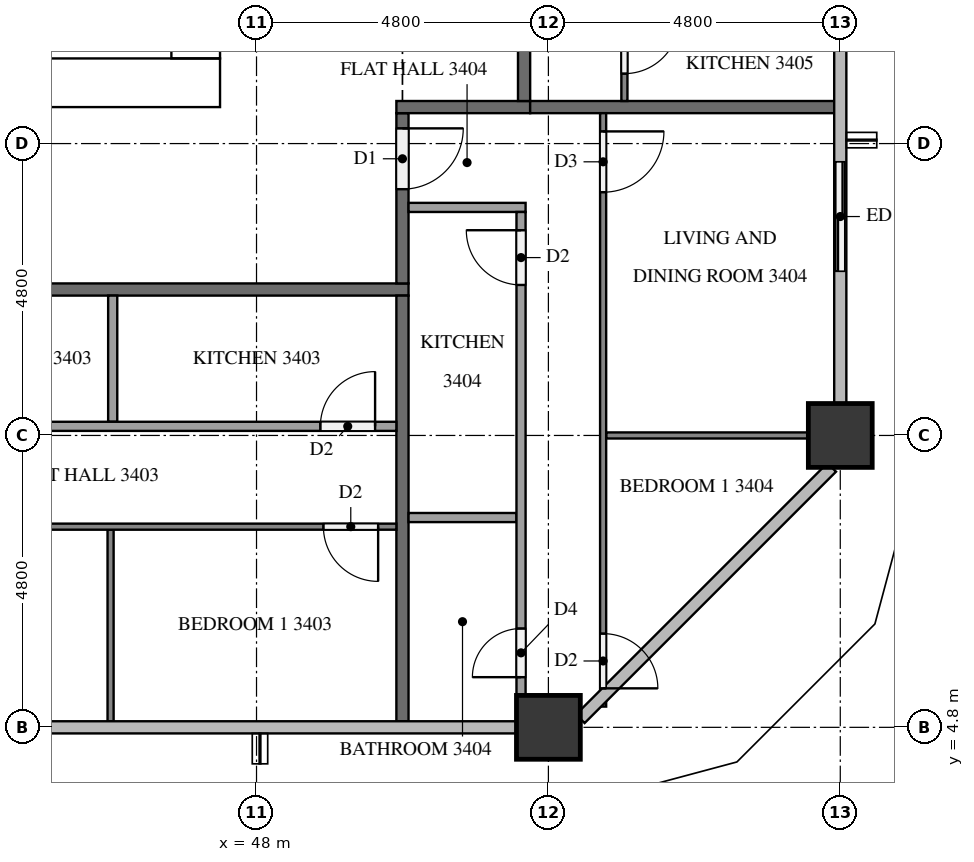
"""IFC4 building model, lengths in metres.
Left out: names, types, materials, properties, quantities, classifications, styles, units other than length and angle.
Written with IfcOpenShell. Run it as: python <this file> out.ifc"""

import sys

from ifc_helpers import new_model, si_unit, direction, frame, frame_2d, origin, origin_2d, place, context, subcontext, project, spatial, rectangle, extrude, element, fill, save


model = new_model("IFC4")
c1 = context("Model", 3, precision=1e-05, world=origin(), true_north=direction((0.0, 1.0)))
c2 = subcontext(c1, "Body", "Model", "MODEL_VIEW")
j1 = project(units=[si_unit("LENGTHUNIT", "METRE"), si_unit("PLANEANGLEUNIT", "RADIAN")], contexts=[c1])
p1 = place(None, origin())
s1 = spatial("IfcSite", under=j1, at=p1, CompositionType="ELEMENT")
p2 = place(p1, origin())
s2 = spatial("IfcBuilding", under=s1, at=p2, CompositionType="ELEMENT")
p3 = place(p2, frame((0.0, 0.0, 133.1)))
s3 = spatial("IfcBuildingStorey", under=s2, at=p3, CompositionType="ELEMENT", Elevation=133.1)
p4 = place(p3, frame((15.0, 15.4, 0.0), z_axis=(0.0, 0.0, 1.0), x_axis=(1.0, 0.0, 0.0)))
e1 = element("IfcWall", 1, at=p4, inside=s3, PredefinedType="SHEAR", context=c2, shape_type="SweptSolid", body=[
    extrude(rectangle(XDim=32.4, YDim=0.8, at=frame_2d((16.2, 0.0))), origin(), (0.0, 0.0, 1.0), 3.2),
])
p5 = place(p4, frame((15.3, 0.0, 0.0)))
e2 = element("IfcOpeningElement", 2, at=p5, cuts=e1, PredefinedType="OPENING", context=c2, shape_type="SweptSolid", body=[
    extrude(rectangle(XDim=1.8, YDim=2.1, at=frame_2d((0.9, 1.05))), frame((0.0, 0.41, 0.0), z_axis=(0.0, -1.0, 0.0), x_axis=(1.0, 0.0, 0.0)), (0.0, 0.0, 1.0), 0.82),
])
p6 = place(p3, frame((47.0, 15.8, 0.0), z_axis=(0.0, 0.0, 1.0), x_axis=(0.0, 1.0, 0.0)))
e3 = element("IfcWall", 3, at=p6, inside=s3, PredefinedType="SHEAR", context=c2, shape_type="SweptSolid", body=[
    extrude(rectangle(XDim=21.2, YDim=0.8, at=frame_2d((10.6, 0.0))), origin(), (0.0, 0.0, 1.0), 3.2),
])
p7 = place(p6, frame((10.3, 0.0, 0.0)))
e4 = element("IfcOpeningElement", 4, at=p7, cuts=e3, PredefinedType="OPENING", context=c2, shape_type="SweptSolid", body=[
    extrude(rectangle(XDim=1.2, YDim=2.1, at=frame_2d((0.6, 1.05))), frame((0.0, 0.41, 0.0), z_axis=(0.0, -1.0, 0.0), x_axis=(1.0, 0.0, 0.0)), (0.0, 0.0, 1.0), 0.82),
])
for number, where, z_axis, x_axis in (
    (5, (52.8, 4.8, 0.0), (0.0, 0.0, 1.0), (1.0, 0.0, 0.0)),
    (6, (57.6, 9.6, 0.0), (0.0, 0.0, 1.0), (1.0, 0.0, 0.0)),
):
    element("IfcColumn", number, at=place(p3, frame(where, z_axis=z_axis, x_axis=x_axis)), inside=s3, PredefinedType="COLUMN", context=c2, shape_type="SweptSolid", body=[
        extrude(rectangle(XDim=1.05, YDim=1.05, at=origin_2d()), origin(), (0.0, 0.0, 1.0), 3.2),
    ])
p8 = place(p3, frame((57.6, 12.0, 0.0), z_axis=(0.0, 0.0, 1.0), x_axis=(0.0, 1.0, 0.0)))
e7 = element("IfcWall", 7, at=p8, inside=s3, PredefinedType="SOLIDWALL", context=c2, shape_type="SweptSolid", body=[
    extrude(rectangle(XDim=2.4, YDim=0.15, at=frame_2d((1.2, 0.0))), origin(), (0.0, 0.0, 1.0), 3.2),
])
p9 = place(p8, frame((0.3, 0.0, 0.0)))
e8 = element("IfcOpeningElement", 8, at=p9, cuts=e7, PredefinedType="OPENING", context=c2, shape_type="SweptSolid", body=[
    extrude(rectangle(XDim=1.8, YDim=2.4, at=frame_2d((0.9, 1.2))), frame((0.0, 0.085, 0.0), z_axis=(0.0, -1.0, 0.0), x_axis=(1.0, 0.0, 0.0)), (0.0, 0.0, 1.0), 0.17),
])
p10 = place(p3, frame((50.5, 12.0, 0.0), z_axis=(0.0, 0.0, 1.0), x_axis=(-1.0, 0.0, 0.0)))
e9 = element("IfcWall", 9, at=p10, inside=s3, PredefinedType="PARTITIONING", context=c2, shape_type="SweptSolid", body=[
    extrude(rectangle(XDim=38.6, YDim=0.2, at=frame_2d((19.3, 0.0))), origin(), (0.0, 0.0, 1.0), 3.2),
])
p11 = place(p10, frame((24.45, 0.0, 0.0)))
e10 = element("IfcOpeningElement", 10, at=p11, cuts=e9, PredefinedType="OPENING", context=c2, shape_type="SweptSolid", body=[
    extrude(rectangle(XDim=1.0, YDim=2.1, at=frame_2d((0.5, 1.05))), frame((0.0, 0.11, 0.0), z_axis=(0.0, -1.0, 0.0), x_axis=(1.0, 0.0, 0.0)), (0.0, 0.0, 1.0), 0.22),
])
p12 = place(p10, frame((10.05, 0.0, 0.0)))
e11 = element("IfcOpeningElement", 11, at=p12, cuts=e9, PredefinedType="OPENING", context=c2, shape_type="SweptSolid", body=[
    extrude(rectangle(XDim=1.0, YDim=2.1, at=frame_2d((0.5, 1.05))), frame((0.0, 0.11, 0.0), z_axis=(0.0, -1.0, 0.0), x_axis=(1.0, 0.0, 0.0)), (0.0, 0.0, 1.0), 0.22),
])
p13 = place(p10, frame((8.35, 0.0, 0.0)))
e12 = element("IfcOpeningElement", 12, at=p13, cuts=e9, PredefinedType="OPENING", context=c2, shape_type="SweptSolid", body=[
    extrude(rectangle(XDim=1.0, YDim=2.1, at=frame_2d((0.5, 1.05))), frame((0.0, 0.11, 0.0), z_axis=(0.0, -1.0, 0.0), x_axis=(1.0, 0.0, 0.0)), (0.0, 0.0, 1.0), 0.22),
])
p14 = place(p3, frame((50.4, 14.9, 0.0), z_axis=(0.0, 0.0, 1.0), x_axis=(0.0, -1.0, 0.0)))
e13 = element("IfcWall", 13, at=p14, inside=s3, PredefinedType="PARTITIONING", context=c2, shape_type="SweptSolid", body=[
    extrude(rectangle(XDim=2.8, YDim=0.2, at=frame_2d((1.4, 0.0))), origin(), (0.0, 0.0, 1.0), 3.2),
])
p15 = place(p14, frame((0.25, 0.0, 0.0)))
e14 = element("IfcOpeningElement", 14, at=p15, cuts=e13, PredefinedType="OPENING", context=c2, shape_type="SweptSolid", body=[
    extrude(rectangle(XDim=1.0, YDim=2.1, at=frame_2d((0.5, 1.05))), frame((0.0, 0.11, 0.0), z_axis=(0.0, -1.0, 0.0), x_axis=(1.0, 0.0, 0.0)), (0.0, 0.0, 1.0), 0.22),
])
p16 = place(p3, frame((50.3, 15.0, 0.0), z_axis=(0.0, 0.0, 1.0), x_axis=(1.0, 0.0, 0.0)))
e15 = element("IfcWall", 15, at=p16, inside=s3, PredefinedType="PARTITIONING", context=c2, shape_type="SweptSolid", body=[
    extrude(rectangle(XDim=2.2, YDim=0.2, at=frame_2d((1.1, 0.0))), origin(), (0.0, 0.0, 1.0), 3.2),
])
p17 = place(p3, frame((52.4, 37.7, 0.0), z_axis=(0.0, 0.0, 1.0), x_axis=(0.0, -1.0, 0.0)))
e16 = element("IfcWall", 16, at=p17, inside=s3, PredefinedType="PARTITIONING", context=c2, shape_type="SweptSolid", body=[
    extrude(rectangle(XDim=22.6, YDim=0.2, at=frame_2d((11.3, 0.0))), origin(), (0.0, 0.0, 1.0), 3.2),
])
p18 = place(p17, frame((0.25, 0.0, 0.0)))
e17 = element("IfcOpeningElement", 17, at=p18, cuts=e16, PredefinedType="OPENING", context=c2, shape_type="SweptSolid", body=[
    extrude(rectangle(XDim=1.0, YDim=2.1, at=frame_2d((0.5, 1.05))), frame((0.0, 0.11, 0.0), z_axis=(0.0, -1.0, 0.0), x_axis=(1.0, 0.0, 0.0)), (0.0, 0.0, 1.0), 0.22),
])
p19 = place(p3, frame((50.4, 11.9, 0.0), z_axis=(0.0, 0.0, 1.0), x_axis=(0.0, -1.0, 0.0)))
e18 = element("IfcWall", 18, at=p19, inside=s3, PredefinedType="PARTITIONING", context=c2, shape_type="SweptSolid", body=[
    extrude(rectangle(XDim=7.0, YDim=0.2, at=frame_2d((3.5, 0.0))), origin(), (0.0, 0.0, 1.0), 3.2),
])
p20 = place(p3, frame((52.5, 15.0, 0.0), z_axis=(0.0, 0.0, 1.0), x_axis=(1.0, 0.0, 0.0)))
e19 = element("IfcWall", 19, at=p20, inside=s3, PredefinedType="PARTITIONING", context=c2, shape_type="SweptSolid", body=[
    extrude(rectangle(XDim=5.0, YDim=0.2, at=frame_2d((2.5, 0.0))), origin(), (0.0, 0.0, 1.0), 3.2),
])
p21 = place(p3, frame((45.6, 8.05, 0.0), z_axis=(0.0, 0.0, 1.0), x_axis=(0.0, -1.0, 0.0)))
e20 = element("IfcWall", 20, at=p21, inside=s3, PredefinedType="PARTITIONING", context=c2, shape_type="SweptSolid", body=[
    extrude(rectangle(XDim=3.15, YDim=0.1, at=frame_2d((1.575, 0.0))), origin(), (0.0, 0.0, 1.0), 3.2),
])
p22 = place(p3, frame((50.3, 8.1, 0.0), z_axis=(0.0, 0.0, 1.0), x_axis=(-1.0, 0.0, 0.0)))
e21 = element("IfcWall", 21, at=p22, inside=s3, PredefinedType="PARTITIONING", context=c2, shape_type="SweptSolid", body=[
    extrude(rectangle(XDim=9.4, YDim=0.1, at=frame_2d((4.7, 0.0))), origin(), (0.0, 0.0, 1.0), 3.2),
])
p23 = place(p22, frame((8.1, 0.0, 0.0)))
e22 = element("IfcOpeningElement", 22, at=p23, cuts=e21, PredefinedType="OPENING", context=c2, shape_type="SweptSolid", body=[
    extrude(rectangle(XDim=1.0, YDim=2.1, at=frame_2d((0.5, 1.05))), frame((0.0, 0.06, 0.0), z_axis=(0.0, -1.0, 0.0), x_axis=(1.0, 0.0, 0.0)), (0.0, 0.0, 1.0), 0.12),
])
p24 = place(p22, frame((0.3, 0.0, 0.0)))
e23 = element("IfcOpeningElement", 23, at=p24, cuts=e21, PredefinedType="OPENING", context=c2, shape_type="SweptSolid", body=[
    extrude(rectangle(XDim=0.9, YDim=2.1, at=frame_2d((0.45, 1.05))), frame((0.0, 0.06, 0.0), z_axis=(0.0, -1.0, 0.0), x_axis=(1.0, 0.0, 0.0)), (0.0, 0.0, 1.0), 0.12),
])
p25 = place(p3, frame((45.635, 11.9, 0.0), z_axis=(0.0, 0.0, 1.0), x_axis=(0.0, -1.0, 0.0)))
e24 = element("IfcWall", 24, at=p25, inside=s3, PredefinedType="PARTITIONING", context=c2, shape_type="SweptSolid", body=[
    extrude(rectangle(XDim=2.075, YDim=0.15, at=frame_2d((1.038, 0.0))), origin(), (0.0, 0.0, 1.0), 3.2),
])
p26 = place(p3, frame((42.525, 9.75, 0.0), z_axis=(0.0, 0.0, 1.0), x_axis=(1.0, 0.0, 0.0)))
e25 = element("IfcWall", 25, at=p26, inside=s3, PredefinedType="PARTITIONING", context=c2, shape_type="SweptSolid", body=[
    extrude(rectangle(XDim=7.775, YDim=0.15, at=frame_2d((3.888, 0.0))), origin(), (0.0, 0.0, 1.0), 3.2),
])
p27 = place(p26, frame((0.3, 0.0, 0.0)))
e26 = element("IfcOpeningElement", 26, at=p27, cuts=e25, PredefinedType="OPENING", context=c2, shape_type="SweptSolid", body=[
    extrude(rectangle(XDim=0.8, YDim=2.1, at=frame_2d((0.4, 1.05))), frame((0.0, 0.085, 0.0), z_axis=(0.0, -1.0, 0.0), x_axis=(1.0, 0.0, 0.0)), (0.0, 0.0, 1.0), 0.17),
])
p28 = place(p26, frame((6.525, 0.0, 0.0)))
e27 = element("IfcOpeningElement", 27, at=p28, cuts=e25, PredefinedType="OPENING", context=c2, shape_type="SweptSolid", body=[
    extrude(rectangle(XDim=0.9, YDim=2.1, at=frame_2d((0.45, 1.05))), frame((0.0, 0.085, 0.0), z_axis=(0.0, -1.0, 0.0), x_axis=(1.0, 0.0, 0.0)), (0.0, 0.0, 1.0), 0.17),
])
p29 = place(p3, frame((53.75, 9.6, 0.0), z_axis=(0.0, 0.0, 1.0), x_axis=(1.0, 0.0, 0.0)))
e28 = element("IfcWall", 28, at=p29, inside=s3, PredefinedType="PARTITIONING", context=c2, shape_type="SweptSolid", body=[
    extrude(rectangle(XDim=3.325, YDim=0.1, at=frame_2d((1.663, 0.0))), origin(), (0.0, 0.0, 1.0), 3.2),
])
p30 = place(p3, frame((53.7, 14.9, 0.0), z_axis=(0.0, 0.0, 1.0), x_axis=(0.0, -1.0, 0.0)))
e29 = element("IfcWall", 29, at=p30, inside=s3, PredefinedType="PARTITIONING", context=c2, shape_type="SweptSolid", body=[
    extrude(rectangle(XDim=9.759, YDim=0.1, at=frame_2d((4.879, 0.0))), origin(), (0.0, 0.0, 1.0), 3.2),
])
p31 = place(p30, frame((0.3, 0.0, 0.0)))
e30 = element("IfcOpeningElement", 30, at=p31, cuts=e29, PredefinedType="OPENING", context=c2, shape_type="SweptSolid", body=[
    extrude(rectangle(XDim=1.0, YDim=2.1, at=frame_2d((0.5, 1.05))), frame((0.0, 0.06, 0.0), z_axis=(0.0, -1.0, 0.0), x_axis=(1.0, 0.0, 0.0)), (0.0, 0.0, 1.0), 0.12),
])
p32 = place(p30, frame((8.559, 0.0, 0.0)))
e31 = element("IfcOpeningElement", 31, at=p32, cuts=e29, PredefinedType="OPENING", context=c2, shape_type="SweptSolid", body=[
    extrude(rectangle(XDim=0.9, YDim=2.1, at=frame_2d((0.45, 1.05))), frame((0.0, 0.06, 0.0), z_axis=(0.0, -1.0, 0.0), x_axis=(1.0, 0.0, 0.0)), (0.0, 0.0, 1.0), 0.12),
])
p33 = place(p3, frame((50.5, 8.25, 0.0), z_axis=(0.0, 0.0, 1.0), x_axis=(1.0, 0.0, 0.0)))
e32 = element("IfcWall", 32, at=p33, inside=s3, PredefinedType="PARTITIONING", context=c2, shape_type="SweptSolid", body=[
    extrude(rectangle(XDim=1.775, YDim=0.15, at=frame_2d((0.887, 0.0))), origin(), (0.0, 0.0, 1.0), 3.2),
])
p34 = place(p3, frame((50.5, 13.35, 0.0), z_axis=(0.0, 0.0, 1.0), x_axis=(1.0, 0.0, 0.0)))
e33 = element("IfcWall", 33, at=p34, inside=s3, PredefinedType="PARTITIONING", context=c2, shape_type="SweptSolid", body=[
    extrude(rectangle(XDim=1.925, YDim=0.15, at=frame_2d((0.962, 0.0))), origin(), (0.0, 0.0, 1.0), 3.2),
])
p35 = place(p3, frame((52.35, 5.325, 0.0), z_axis=(0.0, 0.0, 1.0), x_axis=(0.0, 1.0, 0.0)))
e34 = element("IfcWall", 34, at=p35, inside=s3, PredefinedType="PARTITIONING", context=c2, shape_type="SweptSolid", body=[
    extrude(rectangle(XDim=7.95, YDim=0.15, at=frame_2d((3.975, 0.0))), origin(), (0.0, 0.0, 1.0), 3.2),
])
p36 = place(p35, frame((6.75, 0.0, 0.0)))
e35 = element("IfcOpeningElement", 35, at=p36, cuts=e34, PredefinedType="OPENING", context=c2, shape_type="SweptSolid", body=[
    extrude(rectangle(XDim=0.9, YDim=2.1, at=frame_2d((0.45, 1.05))), frame((0.0, 0.085, 0.0), z_axis=(0.0, -1.0, 0.0), x_axis=(1.0, 0.0, 0.0)), (0.0, 0.0, 1.0), 0.17),
])
p37 = place(p35, frame((0.3, 0.0, 0.0)))
e36 = element("IfcOpeningElement", 36, at=p37, cuts=e34, PredefinedType="OPENING", context=c2, shape_type="SweptSolid", body=[
    extrude(rectangle(XDim=0.8, YDim=2.1, at=frame_2d((0.4, 1.05))), frame((0.0, 0.085, 0.0), z_axis=(0.0, -1.0, 0.0), x_axis=(1.0, 0.0, 0.0)), (0.0, 0.0, 1.0), 0.17),
])
p38 = place(p3, frame((54.05, 37.7, 0.0), z_axis=(0.0, 0.0, 1.0), x_axis=(0.0, -1.0, 0.0)))
e37 = element("IfcWall", 37, at=p38, inside=s3, PredefinedType="PARTITIONING", context=c2, shape_type="SweptSolid", body=[
    extrude(rectangle(XDim=22.6, YDim=0.1, at=frame_2d((11.3, 0.0))), origin(), (0.0, 0.0, 1.0), 3.2),
])
p39 = place(p38, frame((2.85, 0.0, 0.0)))
e38 = element("IfcOpeningElement", 38, at=p39, cuts=e37, PredefinedType="OPENING", context=c2, shape_type="SweptSolid", body=[
    extrude(rectangle(XDim=0.9, YDim=2.1, at=frame_2d((0.45, 1.05))), frame((0.0, 0.06, 0.0), z_axis=(0.0, -1.0, 0.0), x_axis=(1.0, 0.0, 0.0)), (0.0, 0.0, 1.0), 0.12),
])
p40 = place(p38, frame((4.45, 0.0, 0.0)))
e39 = element("IfcOpeningElement", 39, at=p40, cuts=e37, PredefinedType="OPENING", context=c2, shape_type="SweptSolid", body=[
    extrude(rectangle(XDim=0.8, YDim=2.1, at=frame_2d((0.4, 1.05))), frame((0.0, 0.06, 0.0), z_axis=(0.0, -1.0, 0.0), x_axis=(1.0, 0.0, 0.0)), (0.0, 0.0, 1.0), 0.12),
])
p41 = place(p38, frame((10.05, 0.0, 0.0)))
e40 = element("IfcOpeningElement", 40, at=p41, cuts=e37, PredefinedType="OPENING", context=c2, shape_type="SweptSolid", body=[
    extrude(rectangle(XDim=0.9, YDim=2.1, at=frame_2d((0.45, 1.05))), frame((0.0, 0.06, 0.0), z_axis=(0.0, -1.0, 0.0), x_axis=(1.0, 0.0, 0.0)), (0.0, 0.0, 1.0), 0.12),
])
p42 = place(p38, frame((11.65, 0.0, 0.0)))
e41 = element("IfcOpeningElement", 41, at=p42, cuts=e37, PredefinedType="OPENING", context=c2, shape_type="SweptSolid", body=[
    extrude(rectangle(XDim=0.9, YDim=2.1, at=frame_2d((0.45, 1.05))), frame((0.0, 0.06, 0.0), z_axis=(0.0, -1.0, 0.0), x_axis=(1.0, 0.0, 0.0)), (0.0, 0.0, 1.0), 0.12),
])
p43 = place(p38, frame((19.55, 0.0, 0.0)))
e42 = element("IfcOpeningElement", 42, at=p43, cuts=e37, PredefinedType="OPENING", context=c2, shape_type="SweptSolid", body=[
    extrude(rectangle(XDim=1.0, YDim=2.1, at=frame_2d((0.5, 1.05))), frame((0.0, 0.06, 0.0), z_axis=(0.0, -1.0, 0.0), x_axis=(1.0, 0.0, 0.0)), (0.0, 0.0, 1.0), 0.12),
])
p44 = place(p38, frame((21.25, 0.0, 0.0)))
e43 = element("IfcOpeningElement", 43, at=p44, cuts=e37, PredefinedType="OPENING", context=c2, shape_type="SweptSolid", body=[
    extrude(rectangle(XDim=0.9, YDim=2.1, at=frame_2d((0.45, 1.05))), frame((0.0, 0.06, 0.0), z_axis=(0.0, -1.0, 0.0), x_axis=(1.0, 0.0, 0.0)), (0.0, 0.0, 1.0), 0.12),
])
p45 = place(p9, origin())
e44 = element("IfcDoor", 44, at=p45, inside=s3, OperationType="SLIDING_TO_RIGHT", PredefinedType="DOOR", context=c2, shape_type="SweptSolid", body=[
    extrude(rectangle(XDim=1.8, YDim=2.4, at=frame_2d((0.9, 1.2))), frame((0.0, 0.025, 0.0), z_axis=(0.0, -1.0, 0.0), x_axis=(1.0, 0.0, 0.0)), (0.0, 0.0, 1.0), 0.05),
])
fill(e8, e44)
p46 = place(p15, origin())
e45 = element("IfcDoor", 45, at=p46, inside=s3, OperationType="SINGLE_SWING_LEFT", PredefinedType="DOOR", context=c2, shape_type="SweptSolid", body=[
    extrude(rectangle(XDim=1.0, YDim=2.1, at=frame_2d((0.5, 1.05))), frame((0.0, 0.025, 0.0), z_axis=(0.0, -1.0, 0.0), x_axis=(1.0, 0.0, 0.0)), (0.0, 0.0, 1.0), 0.05),
])
fill(e14, e45)
p47 = place(p24, origin())
e46 = element("IfcDoor", 46, at=p47, inside=s3, OperationType="SINGLE_SWING_LEFT", PredefinedType="DOOR", context=c2, shape_type="SweptSolid", body=[
    extrude(rectangle(XDim=0.9, YDim=2.1, at=frame_2d((0.45, 1.05))), frame((0.0, 0.025, 0.0), z_axis=(0.0, -1.0, 0.0), x_axis=(1.0, 0.0, 0.0)), (0.0, 0.0, 1.0), 0.05),
])
fill(e23, e46)
p48 = place(p28, origin())
e47 = element("IfcDoor", 47, at=p48, inside=s3, OperationType="SINGLE_SWING_RIGHT", PredefinedType="DOOR", context=c2, shape_type="SweptSolid", body=[
    extrude(rectangle(XDim=0.9, YDim=2.1, at=frame_2d((0.45, 1.05))), frame((0.0, 0.025, 0.0), z_axis=(0.0, -1.0, 0.0), x_axis=(1.0, 0.0, 0.0)), (0.0, 0.0, 1.0), 0.05),
])
fill(e27, e47)
p49 = place(p31, origin())
e48 = element("IfcDoor", 48, at=p49, inside=s3, OperationType="SINGLE_SWING_LEFT", PredefinedType="DOOR", context=c2, shape_type="SweptSolid", body=[
    extrude(rectangle(XDim=1.0, YDim=2.1, at=frame_2d((0.5, 1.05))), frame((0.0, 0.025, 0.0), z_axis=(0.0, -1.0, 0.0), x_axis=(1.0, 0.0, 0.0)), (0.0, 0.0, 1.0), 0.05),
])
fill(e30, e48)
p50 = place(p32, origin())
e49 = element("IfcDoor", 49, at=p50, inside=s3, OperationType="SINGLE_SWING_RIGHT", PredefinedType="DOOR", context=c2, shape_type="SweptSolid", body=[
    extrude(rectangle(XDim=0.9, YDim=2.1, at=frame_2d((0.45, 1.05))), frame((0.0, 0.025, 0.0), z_axis=(0.0, -1.0, 0.0), x_axis=(1.0, 0.0, 0.0)), (0.0, 0.0, 1.0), 0.05),
])
fill(e31, e49)
p51 = place(p36, origin())
e50 = element("IfcDoor", 50, at=p51, inside=s3, OperationType="SINGLE_SWING_RIGHT", PredefinedType="DOOR", context=c2, shape_type="SweptSolid", body=[
    extrude(rectangle(XDim=0.9, YDim=2.1, at=frame_2d((0.45, 1.05))), frame((0.0, 0.025, 0.0), z_axis=(0.0, -1.0, 0.0), x_axis=(1.0, 0.0, 0.0)), (0.0, 0.0, 1.0), 0.05),
])
fill(e35, e50)
p52 = place(p37, origin())
e51 = element("IfcDoor", 51, at=p52, inside=s3, OperationType="SINGLE_SWING_LEFT", PredefinedType="DOOR", context=c2, shape_type="SweptSolid", body=[
    extrude(rectangle(XDim=0.8, YDim=2.1, at=frame_2d((0.4, 1.05))), frame((0.0, 0.025, 0.0), z_axis=(0.0, -1.0, 0.0), x_axis=(1.0, 0.0, 0.0)), (0.0, 0.0, 1.0), 0.05),
])
fill(e36, e51)
p53 = place(p44, origin())
e52 = element("IfcDoor", 52, at=p53, inside=s3, OperationType="SINGLE_SWING_LEFT", PredefinedType="DOOR", context=c2, shape_type="SweptSolid", body=[
    extrude(rectangle(XDim=0.9, YDim=2.1, at=frame_2d((0.45, 1.05))), frame((0.0, 0.025, 0.0), z_axis=(0.0, -1.0, 0.0), x_axis=(1.0, 0.0, 0.0)), (0.0, 0.0, 1.0), 0.05),
])
fill(e43, e52)
save(model, sys.argv[1])
